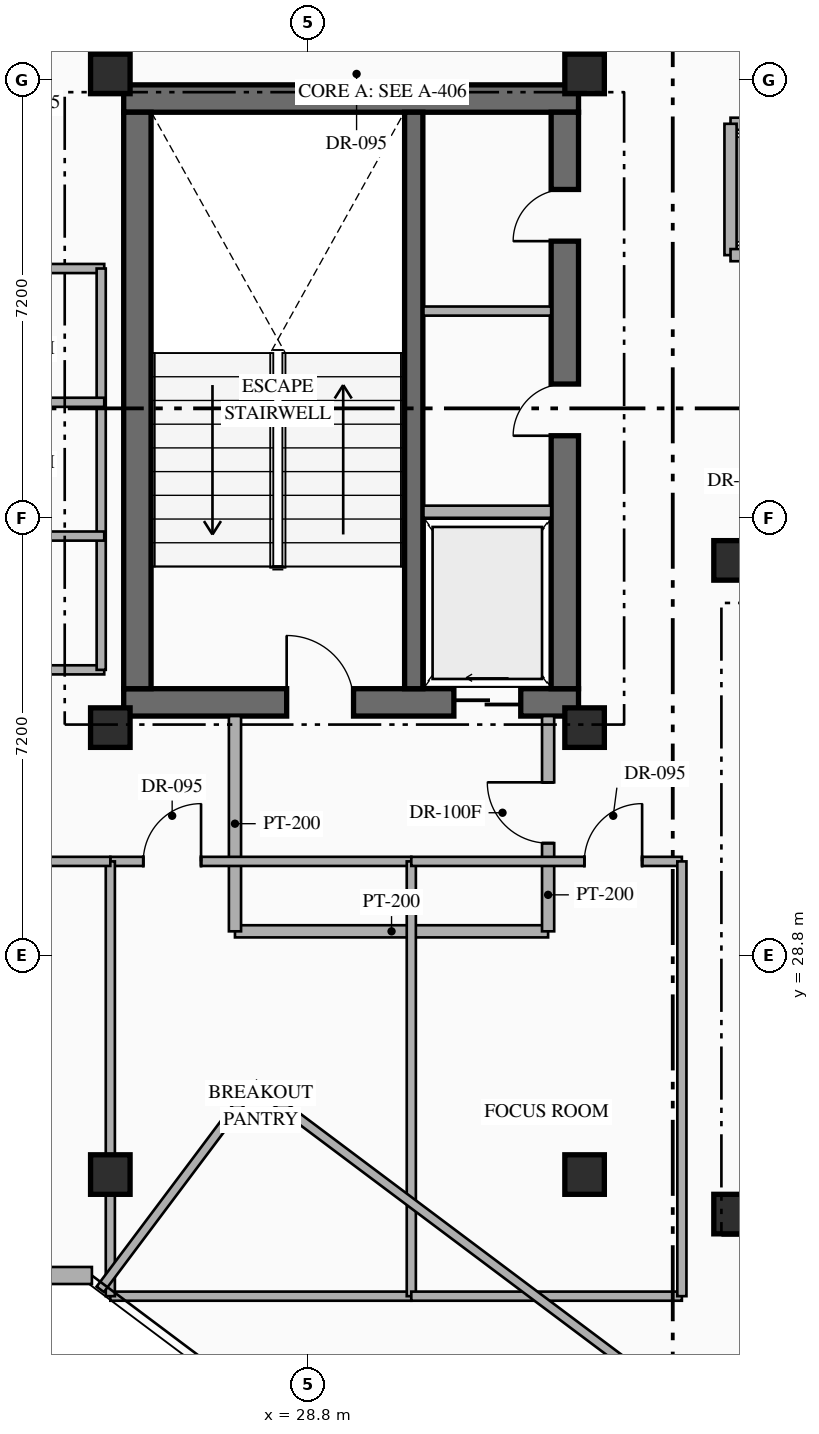
"""IFC4 building model, lengths in metres.
Left out: names, types, materials, properties, quantities, classifications, styles, units other than length and angle.
Written with IfcOpenShell. Run it as: python <this file> out.ifc"""

import sys

from ifc_helpers import new_model, si_unit, direction, frame, frame_2d, origin, origin_2d, place, context, subcontext, project, spatial, rectangle, hollow_rectangle, extrude, element, fill, save


model = new_model("IFC4")
c1 = context("Model", 3, precision=1e-05, world=origin(), true_north=direction((0.0, 1.0)))
c2 = subcontext(c1, "Body", "Model", "MODEL_VIEW")
j1 = project(units=[si_unit("LENGTHUNIT", "METRE"), si_unit("PLANEANGLEUNIT", "RADIAN")], contexts=[c1])
p1 = place(None, origin())
s1 = spatial("IfcSite", under=j1, at=p1, CompositionType="ELEMENT")
p2 = place(p1, origin())
s2 = spatial("IfcBuilding", under=s1, at=p2, CompositionType="ELEMENT")
p3 = place(p2, frame((0.0, 0.0, 246.75)))
s3 = spatial("IfcBuildingStorey", under=s2, at=p3, CompositionType="ELEMENT", Elevation=246.75)
p4 = place(p3, frame((25.77, 32.965, 0.0), z_axis=(0.0, 0.0, 1.0), x_axis=(1.0, 0.0, 0.0)))
e1 = element("IfcWall", 1, at=p4, inside=s3, PredefinedType="SHEAR", context=c2, shape_type="SweptSolid", body=[
    extrude(rectangle(XDim=7.48, YDim=0.45, at=frame_2d((3.74, 0.0))), origin(), (0.0, 0.0, 1.0), 3.6),
])
p5 = place(p4, frame((2.68, 0.0, 0.0)))
e2 = element("IfcOpeningElement", 2, at=p5, cuts=e1, PredefinedType="OPENING", context=c2, shape_type="SweptSolid", body=[
    extrude(rectangle(XDim=1.1, YDim=2.2, at=frame_2d((0.55, 1.1))), frame((0.0, 0.235, 0.0), z_axis=(0.0, -1.0, 0.0), x_axis=(1.0, 0.0, 0.0)), (0.0, 0.0, 1.0), 0.47),
])
p6 = place(p4, frame((5.43, 0.0, 0.0)))
e3 = element("IfcOpeningElement", 3, at=p6, cuts=e1, PredefinedType="OPENING", context=c2, shape_type="SweptSolid", body=[
    extrude(rectangle(XDim=1.1, YDim=2.15, at=frame_2d((0.55, 1.075))), frame((0.0, 0.235, 0.0), z_axis=(0.0, -1.0, 0.0), x_axis=(1.0, 0.0, 0.0)), (0.0, 0.0, 1.0), 0.47),
])
p7 = place(p3, frame((25.77, 42.895, 0.0), z_axis=(0.0, 0.0, 1.0), x_axis=(1.0, 0.0, 0.0)))
e4 = element("IfcWall", 4, at=p7, inside=s3, PredefinedType="SHEAR", context=c2, shape_type="SweptSolid", body=[
    extrude(rectangle(XDim=7.48, YDim=0.45, at=frame_2d((3.74, 0.0))), origin(), (0.0, 0.0, 1.0), 3.6),
])
p8 = place(p3, frame((25.995, 33.19, 0.0), z_axis=(0.0, 0.0, 1.0), x_axis=(0.0, 1.0, 0.0)))
e5 = element("IfcWall", 5, at=p8, inside=s3, PredefinedType="SHEAR", context=c2, shape_type="SweptSolid", body=[
    extrude(rectangle(XDim=9.48, YDim=0.45, at=frame_2d((4.74, 0.0))), origin(), (0.0, 0.0, 1.0), 3.6),
])
p9 = place(p3, frame((33.025, 33.19, 0.0), z_axis=(0.0, 0.0, 1.0), x_axis=(0.0, 1.0, 0.0)))
e6 = element("IfcWall", 6, at=p9, inside=s3, PredefinedType="SHEAR", context=c2, shape_type="SweptSolid", body=[
    extrude(rectangle(XDim=9.48, YDim=0.45, at=frame_2d((4.74, 0.0))), origin(), (0.0, 0.0, 1.0), 3.6),
])
p10 = place(p9, frame((4.16, 0.0, 0.0)))
e7 = element("IfcOpeningElement", 7, at=p10, cuts=e6, PredefinedType="OPENING", context=c2, shape_type="SweptSolid", body=[
    extrude(rectangle(XDim=0.85, YDim=2.08, at=frame_2d((0.425, 1.04))), frame((0.0, 0.235, 0.0), z_axis=(0.0, -1.0, 0.0), x_axis=(1.0, 0.0, 0.0)), (0.0, 0.0, 1.0), 0.47),
])
p11 = place(p9, frame((7.36, 0.0, 0.0)))
e8 = element("IfcOpeningElement", 8, at=p11, cuts=e6, PredefinedType="OPENING", context=c2, shape_type="SweptSolid", body=[
    extrude(rectangle(XDim=0.85, YDim=2.08, at=frame_2d((0.425, 1.04))), frame((0.0, 0.235, 0.0), z_axis=(0.0, -1.0, 0.0), x_axis=(1.0, 0.0, 0.0)), (0.0, 0.0, 1.0), 0.47),
])
p12 = place(p3, frame((30.54, 33.19, 0.0), z_axis=(0.0, 0.0, 1.0), x_axis=(0.0, 1.0, 0.0)))
e9 = element("IfcWall", 9, at=p12, inside=s3, PredefinedType="SHEAR", context=c2, shape_type="SweptSolid", body=[
    extrude(rectangle(XDim=9.48, YDim=0.3, at=frame_2d((4.74, 0.0))), origin(), (0.0, 0.0, 1.0), 3.6),
])
for number, where, z_axis, x_axis in (
    (10, (25.55, 32.55, 0.0), (0.0, 0.0, 1.0), (1.0, 0.0, 0.0)),
    (11, (33.35, 32.55, 0.0), (0.0, 0.0, 1.0), (1.0, 0.0, 0.0)),
    (12, (25.55, 43.3, 0.0), (0.0, 0.0, 1.0), (1.0, 0.0, 0.0)),
    (13, (33.35, 43.3, 0.0), (0.0, 0.0, 1.0), (1.0, 0.0, 0.0)),
    (14, (35.8, 24.55, 0.0), (0.0, 0.0, 1.0), (1.0, 0.0, 0.0)),
    (15, (35.8, 35.3, 0.0), (0.0, 0.0, 1.0), (1.0, 0.0, 0.0)),
    (16, (25.55, 25.2, 0.0), (0.0, 0.0, 1.0), (1.0, 0.0, 0.0)),
    (17, (33.35, 25.2, 0.0), (0.0, 0.0, 1.0), (1.0, 0.0, 0.0)),
):
    element("IfcColumn", number, at=place(p3, frame(where, z_axis=z_axis, x_axis=x_axis)), inside=s3, PredefinedType="COLUMN", context=c2, shape_type="SweptSolid", body=[
        extrude(hollow_rectangle(XDim=0.65, YDim=0.65, WallThickness=0.025, at=origin_2d()), origin(), (0.0, 0.0, 1.0), 3.6),
    ])
p13 = place(p3, frame((25.247, 23.54, 0.0), z_axis=(0.0, 0.0, 1.0), x_axis=(-1.0, 0.0, 0.0)))
e18 = element("IfcWall", 18, at=p13, inside=s3, PredefinedType="STANDARD", context=c2, shape_type="SweptSolid", body=[
    extrude(rectangle(XDim=4.789, YDim=0.28, at=frame_2d((2.395, 0.0))), origin(), (0.0, 0.0, 1.0), 3.35),
])
p14 = place(p3, frame((30.7, 36.1, 0.0), z_axis=(0.0, 0.0, 1.0), x_axis=(1.0, 0.0, 0.0)))
e19 = element("IfcWall", 19, at=p14, inside=s3, PredefinedType="STANDARD", context=c2, shape_type="SweptSolid", body=[
    extrude(rectangle(XDim=2.1, YDim=0.2, at=frame_2d((1.05, 0.0))), origin(), (0.0, 0.0, 1.0), 3.35),
])
p15 = place(p3, frame((30.7, 39.4, 0.0), z_axis=(0.0, 0.0, 1.0), x_axis=(1.0, 0.0, 0.0)))
e20 = element("IfcWall", 20, at=p15, inside=s3, PredefinedType="PARTITIONING", context=c2, shape_type="SweptSolid", body=[
    extrude(rectangle(XDim=2.1, YDim=0.15, at=frame_2d((1.05, 0.0))), origin(), (0.0, 0.0, 1.0), 3.35),
])
p16 = place(p3, frame((27.6, 29.2, 0.0), z_axis=(0.0, 0.0, 1.0), x_axis=(1.0, 0.0, 0.0)))
e21 = element("IfcWall", 21, at=p16, inside=s3, PredefinedType="STANDARD", context=c2, shape_type="SweptSolid", body=[
    extrude(rectangle(XDim=5.15, YDim=0.2, at=frame_2d((2.575, 0.0))), origin(), (0.0, 0.0, 1.0), 3.35),
])
p17 = place(p3, frame((27.6, 29.2, 0.0), z_axis=(0.0, 0.0, 1.0), x_axis=(0.0, 1.0, 0.0)))
e22 = element("IfcWall", 22, at=p17, inside=s3, PredefinedType="STANDARD", context=c2, shape_type="SweptSolid", body=[
    extrude(rectangle(XDim=3.54, YDim=0.2, at=frame_2d((1.77, 0.0))), origin(), (0.0, 0.0, 1.0), 3.35),
])
p18 = place(p3, frame((32.75, 29.2, 0.0), z_axis=(0.0, 0.0, 1.0), x_axis=(0.0, 1.0, 0.0)))
e23 = element("IfcWall", 23, at=p18, inside=s3, PredefinedType="STANDARD", context=c2, shape_type="SweptSolid", body=[
    extrude(rectangle(XDim=3.54, YDim=0.2, at=frame_2d((1.77, 0.0))), origin(), (0.0, 0.0, 1.0), 3.35),
])
p19 = place(p18, frame((1.45, 0.0, 0.0)))
e24 = element("IfcOpeningElement", 24, at=p19, cuts=e23, PredefinedType="OPENING", context=c2, shape_type="SweptSolid", body=[
    extrude(rectangle(XDim=1.0, YDim=2.2, at=frame_2d((0.5, 1.1))), frame((0.0, 0.11, 0.0), z_axis=(0.0, -1.0, 0.0), x_axis=(1.0, 0.0, 0.0)), (0.0, 0.0, 1.0), 0.22),
])
p20 = place(p3, frame((35.75, 42.48, 0.0), z_axis=(0.0, 0.0, 1.0), x_axis=(1.0, 0.0, 0.0)))
e25 = element("IfcWall", 25, at=p20, inside=s3, PredefinedType="STANDARD", context=c2, shape_type="SweptSolid", body=[
    extrude(rectangle(XDim=9.11, YDim=0.2, at=frame_2d((4.555, 0.0))), origin(), (0.0, 0.0, 1.0), 3.35),
])
p21 = place(p3, frame((35.75, 40.32, 0.0), z_axis=(0.0, 0.0, 1.0), x_axis=(0.0, 1.0, 0.0)))
e26 = element("IfcWall", 26, at=p21, inside=s3, PredefinedType="STANDARD", context=c2, shape_type="SweptSolid", body=[
    extrude(rectangle(XDim=2.16, YDim=0.2, at=frame_2d((1.08, 0.0))), origin(), (0.0, 0.0, 1.0), 3.35),
])
p22 = place(p3, frame((35.75, 40.32, 0.0), z_axis=(0.0, 0.0, 1.0), x_axis=(1.0, 0.0, 0.0)))
e27 = element("IfcWall", 27, at=p22, inside=s3, PredefinedType="STANDARD", context=c2, shape_type="SweptSolid", body=[
    extrude(rectangle(XDim=9.11, YDim=0.2, at=frame_2d((4.555, 0.0))), origin(), (0.0, 0.0, 1.0), 3.35),
])
p23 = place(p22, frame((0.53, 0.0, 0.0)))
e28 = element("IfcOpeningElement", 28, at=p23, cuts=e27, PredefinedType="OPENING", context=c2, shape_type="SweptSolid", body=[
    extrude(rectangle(XDim=1.1, YDim=2.18, at=frame_2d((0.55, 1.09))), frame((0.0, 0.11, 0.0), z_axis=(0.0, -1.0, 0.0), x_axis=(1.0, 0.0, 0.0)), (0.0, 0.0, 1.0), 0.22),
])
p24 = place(p22, frame((2.73, 0.0, 0.0)))
e29 = element("IfcOpeningElement", 29, at=p24, cuts=e27, PredefinedType="OPENING", context=c2, shape_type="SweptSolid", body=[
    extrude(rectangle(XDim=1.1, YDim=2.18, at=frame_2d((0.55, 1.09))), frame((0.0, 0.11, 0.0), z_axis=(0.0, -1.0, 0.0), x_axis=(1.0, 0.0, 0.0)), (0.0, 0.0, 1.0), 0.22),
])
p25 = place(p22, frame((4.93, 0.0, 0.0)))
e30 = element("IfcOpeningElement", 30, at=p25, cuts=e27, PredefinedType="OPENING", context=c2, shape_type="SweptSolid", body=[
    extrude(rectangle(XDim=1.1, YDim=2.18, at=frame_2d((0.55, 1.09))), frame((0.0, 0.11, 0.0), z_axis=(0.0, -1.0, 0.0), x_axis=(1.0, 0.0, 0.0)), (0.0, 0.0, 1.0), 0.22),
])
p26 = place(p22, frame((7.13, 0.0, 0.0)))
e31 = element("IfcOpeningElement", 31, at=p26, cuts=e27, PredefinedType="OPENING", context=c2, shape_type="SweptSolid", body=[
    extrude(rectangle(XDim=1.1, YDim=2.18, at=frame_2d((0.55, 1.09))), frame((0.0, 0.11, 0.0), z_axis=(0.0, -1.0, 0.0), x_axis=(1.0, 0.0, 0.0)), (0.0, 0.0, 1.0), 0.22),
])
for number, where, z_axis, x_axis in (
    (32, (22.15, 33.5, 0.0), (0.0, 0.0, 1.0), (1.0, 0.0, 0.0)),
    (33, (22.15, 40.1, 0.0), (0.0, 0.0, 1.0), (1.0, 0.0, 0.0)),
):
    element("IfcWall", number, at=place(p3, frame(where, z_axis=z_axis, x_axis=x_axis)), inside=s3, PredefinedType="PARTITIONING", context=c2, shape_type="SweptSolid", body=[
        extrude(rectangle(XDim=3.3, YDim=0.15, at=frame_2d((1.65, 0.0))), origin(), (0.0, 0.0, 1.0), 3.35),
    ])
p27 = place(p3, frame((25.4, 33.5, 0.0), z_axis=(0.0, 0.0, 1.0), x_axis=(0.0, 1.0, 0.0)))
e34 = element("IfcWall", 34, at=p27, inside=s3, PredefinedType="PARTITIONING", context=c2, shape_type="SweptSolid", body=[
    extrude(rectangle(XDim=6.6, YDim=0.15, at=frame_2d((3.3, 0.0))), origin(), (0.0, 0.0, 1.0), 3.35),
])
for number, where, z_axis, x_axis in (
    (35, (22.15, 35.7, 0.0), (0.0, 0.0, 1.0), (1.0, 0.0, 0.0)),
    (36, (22.15, 37.9, 0.0), (0.0, 0.0, 1.0), (1.0, 0.0, 0.0)),
):
    element("IfcWall", number, at=place(p3, frame(where, z_axis=z_axis, x_axis=x_axis)), inside=s3, PredefinedType="PARTITIONING", context=c2, shape_type="SweptSolid", body=[
        extrude(rectangle(XDim=3.3, YDim=0.15, at=frame_2d((1.65, 0.0))), origin(), (0.0, 0.0, 1.0), 3.35),
    ])
p28 = place(p3, frame((25.55, 23.2, 0.0), z_axis=(0.0, 0.0, 1.0), x_axis=(1.0, 0.0, 0.0)))
e37 = element("IfcWall", 37, at=p28, inside=s3, PredefinedType="PARTITIONING", context=c2, shape_type="SweptSolid", body=[
    extrude(rectangle(XDim=4.95, YDim=0.15, at=frame_2d((2.475, 0.0))), origin(), (0.0, 0.0, 1.0), 3.35),
])
p29 = place(p3, frame((25.55, 30.35, 0.0), z_axis=(0.0, 0.0, 1.0), x_axis=(1.0, 0.0, 0.0)))
e38 = element("IfcWall", 38, at=p29, inside=s3, PredefinedType="PARTITIONING", context=c2, shape_type="SweptSolid", body=[
    extrude(rectangle(XDim=4.95, YDim=0.15, at=frame_2d((2.475, 0.0))), origin(), (0.0, 0.0, 1.0), 3.35),
])
p30 = place(p29, frame((0.542, 0.0, 0.0)))
e39 = element("IfcOpeningElement", 39, at=p30, cuts=e38, PredefinedType="OPENING", context=c2, shape_type="SweptSolid", body=[
    extrude(rectangle(XDim=0.95, YDim=2.15, at=frame_2d((0.475, 1.075))), frame((0.0, 0.085, 0.0), z_axis=(0.0, -1.0, 0.0), x_axis=(1.0, 0.0, 0.0)), (0.0, 0.0, 1.0), 0.17),
])
p31 = place(p3, frame((25.55, 23.2, 0.0), z_axis=(0.0, 0.0, 1.0), x_axis=(0.0, 1.0, 0.0)))
e40 = element("IfcWall", 40, at=p31, inside=s3, PredefinedType="PARTITIONING", context=c2, shape_type="SweptSolid", body=[
    extrude(rectangle(XDim=7.15, YDim=0.15, at=frame_2d((3.575, 0.0))), origin(), (0.0, 0.0, 1.0), 2.757),
])
p32 = place(p3, frame((30.5, 23.2, 0.0), z_axis=(0.0, 0.0, 1.0), x_axis=(0.0, 1.0, 0.0)))
e41 = element("IfcWall", 41, at=p32, inside=s3, PredefinedType="PARTITIONING", context=c2, shape_type="SweptSolid", body=[
    extrude(rectangle(XDim=7.15, YDim=0.15, at=frame_2d((3.575, 0.0))), origin(), (0.0, 0.0, 1.0), 3.35),
])
p33 = place(p3, frame((30.5, 23.2, 0.0), z_axis=(0.0, 0.0, 1.0), x_axis=(1.0, 0.0, 0.0)))
e42 = element("IfcWall", 42, at=p33, inside=s3, PredefinedType="PARTITIONING", context=c2, shape_type="SweptSolid", body=[
    extrude(rectangle(XDim=4.45, YDim=0.15, at=frame_2d((2.225, 0.0))), origin(), (0.0, 0.0, 1.0), 3.35),
])
p34 = place(p3, frame((30.5, 30.35, 0.0), z_axis=(0.0, 0.0, 1.0), x_axis=(1.0, 0.0, 0.0)))
e43 = element("IfcWall", 43, at=p34, inside=s3, PredefinedType="PARTITIONING", context=c2, shape_type="SweptSolid", body=[
    extrude(rectangle(XDim=4.45, YDim=0.15, at=frame_2d((2.225, 0.0))), origin(), (0.0, 0.0, 1.0), 3.35),
])
p35 = place(p34, frame((2.846, 0.0, 0.0)))
e44 = element("IfcOpeningElement", 44, at=p35, cuts=e43, PredefinedType="OPENING", context=c2, shape_type="SweptSolid", body=[
    extrude(rectangle(XDim=0.95, YDim=2.15, at=frame_2d((0.475, 1.075))), frame((0.0, 0.085, 0.0), z_axis=(0.0, -1.0, 0.0), x_axis=(1.0, 0.0, 0.0)), (0.0, 0.0, 1.0), 0.17),
])
p36 = place(p3, frame((34.95, 23.2, 0.0), z_axis=(0.0, 0.0, 1.0), x_axis=(0.0, 1.0, 0.0)))
e45 = element("IfcWall", 45, at=p36, inside=s3, PredefinedType="PARTITIONING", context=c2, shape_type="SweptSolid", body=[
    extrude(rectangle(XDim=7.15, YDim=0.15, at=frame_2d((3.575, 0.0))), origin(), (0.0, 0.0, 1.0), 3.35),
])
p37 = place(p3, frame((22.25, 30.35, 0.0), z_axis=(0.0, 0.0, 1.0), x_axis=(1.0, 0.0, 0.0)))
e46 = element("IfcWall", 46, at=p37, inside=s3, PredefinedType="PARTITIONING", context=c2, shape_type="SweptSolid", body=[
    extrude(rectangle(XDim=3.3, YDim=0.15, at=frame_2d((1.65, 0.0))), origin(), (0.0, 0.0, 1.0), 3.35),
])
p38 = place(p37, frame((1.175, 0.0, 0.0)))
e47 = element("IfcOpeningElement", 47, at=p38, cuts=e46, PredefinedType="OPENING", context=c2, shape_type="SweptSolid", body=[
    extrude(rectangle(XDim=0.95, YDim=2.15, at=frame_2d((0.475, 1.075))), frame((0.0, 0.085, 0.0), z_axis=(0.0, -1.0, 0.0), x_axis=(1.0, 0.0, 0.0)), (0.0, 0.0, 1.0), 0.17),
])
p39 = place(p3, frame((27.91, 26.68, 0.0), z_axis=(0.0, 0.0, 1.0), x_axis=(0.8, -0.6, 0.0)))
e48 = element("IfcWall", 48, at=p39, inside=s3, PredefinedType="PARTITIONING", context=c2, shape_type="SweptSolid", body=[
    extrude(rectangle(XDim=17.76, YDim=0.15, at=frame_2d((8.88, 0.0))), origin(), (0.0, 0.0, 1.0), 3.35),
])
p40 = place(p39, frame((11.294, 0.0, 0.0)))
e49 = element("IfcOpeningElement", 49, at=p40, cuts=e48, PredefinedType="OPENING", context=c2, shape_type="SweptSolid", body=[
    extrude(rectangle(XDim=0.95, YDim=2.15, at=frame_2d((0.475, 1.075))), frame((0.0, 0.085, 0.0), z_axis=(0.0, -1.0, 0.0), x_axis=(1.0, 0.0, 0.0)), (0.0, 0.0, 1.0), 0.17),
])
p41 = place(p3, frame((25.384, 23.312, 0.0), z_axis=(0.0, 0.0, 1.0), x_axis=(0.599990721155, 0.80000695905, 0.0)))
e50 = element("IfcWall", 50, at=p41, inside=s3, PredefinedType="PARTITIONING", context=c2, shape_type="SweptSolid", body=[
    extrude(rectangle(XDim=4.21, YDim=0.15, at=frame_2d((2.105, 0.0))), origin(), (0.0, 0.0, 1.0), 3.35),
])
p42 = place(p5, origin())
e51 = element("IfcDoor", 51, at=p42, inside=s3, OperationType="SINGLE_SWING_LEFT", PredefinedType="DOOR", context=c2, shape_type="SweptSolid", body=[
    extrude(rectangle(XDim=1.1, YDim=2.2, at=frame_2d((0.55, 1.1))), frame((0.0, 0.025, 0.0), z_axis=(0.0, -1.0, 0.0), x_axis=(1.0, 0.0, 0.0)), (0.0, 0.0, 1.0), 0.05),
])
fill(e2, e51)
p43 = place(p6, origin())
e52 = element("IfcDoor", 52, at=p43, inside=s3, OperationType="SLIDING_TO_LEFT", PredefinedType="USERDEFINED", context=c2, shape_type="SweptSolid", body=[
    extrude(rectangle(XDim=1.1, YDim=2.15, at=frame_2d((0.55, 1.075))), frame((0.0, 0.025, 0.0), z_axis=(0.0, -1.0, 0.0), x_axis=(1.0, 0.0, 0.0)), (0.0, 0.0, 1.0), 0.05),
])
fill(e3, e52)
p44 = place(p10, origin())
e53 = element("IfcDoor", 53, at=p44, inside=s3, OperationType="SINGLE_SWING_LEFT", PredefinedType="DOOR", context=c2, shape_type="SweptSolid", body=[
    extrude(rectangle(XDim=0.85, YDim=2.08, at=frame_2d((0.425, 1.04))), frame((0.0, 0.025, 0.0), z_axis=(0.0, -1.0, 0.0), x_axis=(1.0, 0.0, 0.0)), (0.0, 0.0, 1.0), 0.05),
])
fill(e7, e53)
p45 = place(p11, origin())
e54 = element("IfcDoor", 54, at=p45, inside=s3, OperationType="SINGLE_SWING_LEFT", PredefinedType="DOOR", context=c2, shape_type="SweptSolid", body=[
    extrude(rectangle(XDim=0.85, YDim=2.08, at=frame_2d((0.425, 1.04))), frame((0.0, 0.025, 0.0), z_axis=(0.0, -1.0, 0.0), x_axis=(1.0, 0.0, 0.0)), (0.0, 0.0, 1.0), 0.05),
])
fill(e8, e54)
p46 = place(p19, origin())
e55 = element("IfcDoor", 55, at=p46, inside=s3, OperationType="SINGLE_SWING_RIGHT", PredefinedType="DOOR", context=c2, shape_type="SweptSolid", body=[
    extrude(rectangle(XDim=1.0, YDim=2.2, at=frame_2d((0.5, 1.1))), frame((0.0, 0.025, 0.0), z_axis=(0.0, -1.0, 0.0), x_axis=(1.0, 0.0, 0.0)), (0.0, 0.0, 1.0), 0.05),
])
fill(e24, e55)
p47 = place(p30, origin())
e56 = element("IfcDoor", 56, at=p47, inside=s3, OperationType="SINGLE_SWING_RIGHT", PredefinedType="DOOR", context=c2, shape_type="SweptSolid", body=[
    extrude(rectangle(XDim=0.95, YDim=2.15, at=frame_2d((0.475, 1.075))), frame((0.0, 0.025, 0.0), z_axis=(0.0, -1.0, 0.0), x_axis=(1.0, 0.0, 0.0)), (0.0, 0.0, 1.0), 0.05),
])
fill(e39, e56)
p48 = place(p35, origin())
e57 = element("IfcDoor", 57, at=p48, inside=s3, OperationType="SINGLE_SWING_RIGHT", PredefinedType="DOOR", context=c2, shape_type="SweptSolid", body=[
    extrude(rectangle(XDim=0.95, YDim=2.15, at=frame_2d((0.475, 1.075))), frame((0.0, 0.025, 0.0), z_axis=(0.0, -1.0, 0.0), x_axis=(1.0, 0.0, 0.0)), (0.0, 0.0, 1.0), 0.05),
])
fill(e44, e57)
save(model, sys.argv[1])
